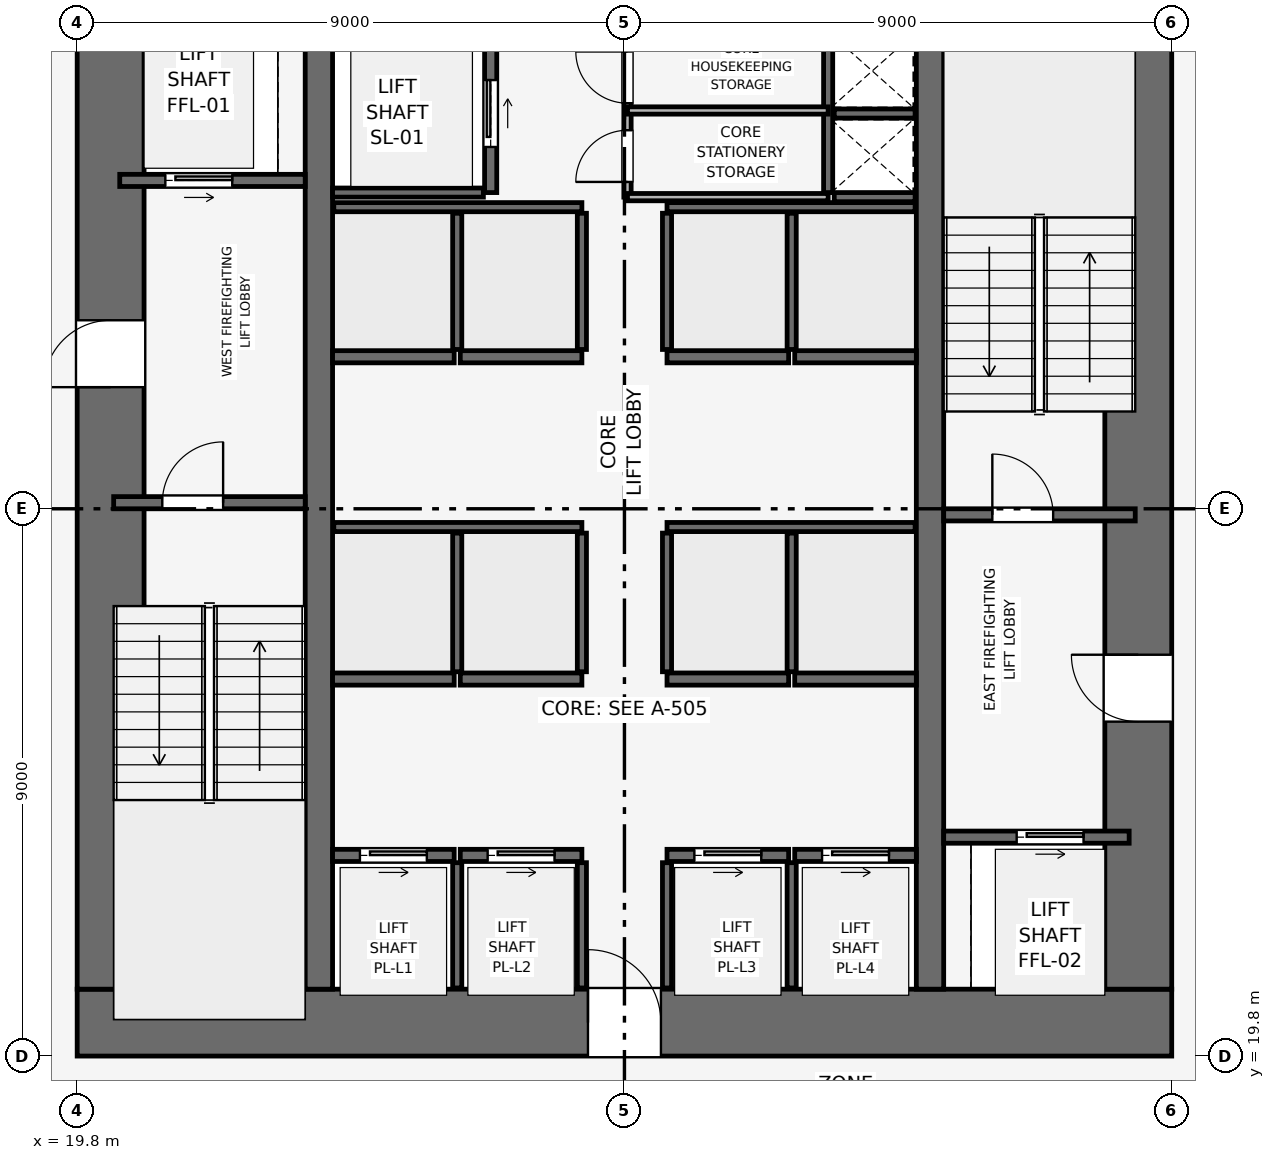
"""IFC4 building model, lengths in metres.
Left out: names, types, materials, properties, quantities, classifications, styles, units other than length and angle.
Written with IfcOpenShell. Run it as: python <this file> out.ifc"""

import sys

from ifc_helpers import new_model, si_unit, direction, frame, frame_2d, origin, place, context, subcontext, project, spatial, rectangle, extrude, element, fill, save


model = new_model("IFC4")
c1 = context("Model", 3, precision=1e-05, world=origin(), true_north=direction((0.0, 1.0)))
c2 = subcontext(c1, "Body", "Model", "MODEL_VIEW")
j1 = project(units=[si_unit("LENGTHUNIT", "METRE"), si_unit("PLANEANGLEUNIT", "RADIAN")], contexts=[c1])
p1 = place(None, origin())
s1 = spatial("IfcSite", under=j1, at=p1, CompositionType="ELEMENT")
p2 = place(p1, origin())
s2 = spatial("IfcBuilding", under=s1, at=p2, CompositionType="ELEMENT")
p3 = place(p2, frame((0.0, 0.0, 69.0)))
s3 = spatial("IfcBuildingStorey", under=s2, at=p3, CompositionType="ELEMENT", Elevation=69.0)
p4 = place(p3, frame((19.8, 20.35, 0.0), z_axis=(0.0, 0.0, 1.0), x_axis=(1.0, 0.0, 0.0)))
e1 = element("IfcWall", 1, at=p4, inside=s3, PredefinedType="SHEAR", context=c2, shape_type="SweptSolid", body=[
    extrude(rectangle(XDim=18.0, YDim=1.1, at=frame_2d((9.0, 0.0))), origin(), (0.0, 0.0, 1.0), 3.9),
])
p5 = place(p4, frame((8.4, 0.0, 0.0)))
e2 = element("IfcOpeningElement", 2, at=p5, cuts=e1, PredefinedType="OPENING", context=c2, shape_type="SweptSolid", body=[
    extrude(rectangle(XDim=1.2, YDim=2.2, at=frame_2d((0.6, 1.1))), frame((0.0, 0.56, 0.0), z_axis=(0.0, -1.0, 0.0), x_axis=(1.0, 0.0, 0.0)), (0.0, 0.0, 1.0), 1.12),
])
p6 = place(p3, frame((20.35, 20.9, 0.0), z_axis=(0.0, 0.0, 1.0), x_axis=(0.0, 1.0, 0.0)))
e3 = element("IfcWall", 3, at=p6, inside=s3, PredefinedType="SHEAR", context=c2, shape_type="SweptSolid", body=[
    extrude(rectangle(XDim=15.8, YDim=1.1, at=frame_2d((7.9, 0.0))), origin(), (0.0, 0.0, 1.0), 3.9),
])
p7 = place(p6, frame((9.9, 0.0, 0.0)))
e4 = element("IfcOpeningElement", 4, at=p7, cuts=e3, PredefinedType="OPENING", context=c2, shape_type="SweptSolid", body=[
    extrude(rectangle(XDim=1.1, YDim=2.15, at=frame_2d((0.55, 1.075))), frame((0.0, 0.56, 0.0), z_axis=(0.0, -1.0, 0.0), x_axis=(1.0, 0.0, 0.0)), (0.0, 0.0, 1.0), 1.12),
])
p8 = place(p3, frame((37.25, 20.9, 0.0), z_axis=(0.0, 0.0, 1.0), x_axis=(0.0, 1.0, 0.0)))
e5 = element("IfcWall", 5, at=p8, inside=s3, PredefinedType="SHEAR", context=c2, shape_type="SweptSolid", body=[
    extrude(rectangle(XDim=15.8, YDim=1.1, at=frame_2d((7.9, 0.0))), origin(), (0.0, 0.0, 1.0), 3.9),
])
p9 = place(p8, frame((4.4, 0.0, 0.0)))
e6 = element("IfcOpeningElement", 6, at=p9, cuts=e5, PredefinedType="OPENING", context=c2, shape_type="SweptSolid", body=[
    extrude(rectangle(XDim=1.1, YDim=2.15, at=frame_2d((0.55, 1.075))), frame((0.0, 0.56, 0.0), z_axis=(0.0, -1.0, 0.0), x_axis=(1.0, 0.0, 0.0)), (0.0, 0.0, 1.0), 1.12),
])
for number, where, z_axis, x_axis in (
    (7, (23.775, 20.9, 0.0), (0.0, 0.0, 1.0), (0.0, 1.0, 0.0)),
    (8, (33.825, 20.9, 0.0), (0.0, 0.0, 1.0), (0.0, 1.0, 0.0)),
):
    element("IfcWall", number, at=place(p3, frame(where, z_axis=z_axis, x_axis=x_axis)), inside=s3, PredefinedType="SHEAR", context=c2, shape_type="SweptSolid", body=[
        extrude(rectangle(XDim=15.8, YDim=0.45, at=frame_2d((7.9, 0.0))), origin(), (0.0, 0.0, 1.0), 3.9),
    ])
p10 = place(p3, frame((20.4, 28.9, 0.0), z_axis=(0.0, 0.0, 1.0), x_axis=(1.0, 0.0, 0.0)))
e9 = element("IfcWall", 9, at=p10, inside=s3, PredefinedType="SHEAR", context=c2, shape_type="SweptSolid", body=[
    extrude(rectangle(XDim=3.15, YDim=0.2, at=frame_2d((1.575, 0.0))), origin(), (0.0, 0.0, 1.0), 3.65),
])
p11 = place(p10, frame((0.8, 0.0, 0.0)))
e10 = element("IfcOpeningElement", 10, at=p11, cuts=e9, PredefinedType="OPENING", context=c2, shape_type="SweptSolid", body=[
    extrude(rectangle(XDim=1.0, YDim=2.1, at=frame_2d((0.5, 1.05))), frame((0.0, 0.11, 0.0), z_axis=(0.0, -1.0, 0.0), x_axis=(1.0, 0.0, 0.0)), (0.0, 0.0, 1.0), 0.22),
])
p12 = place(p3, frame((34.05, 28.7, 0.0), z_axis=(0.0, 0.0, 1.0), x_axis=(1.0, 0.0, 0.0)))
e11 = element("IfcWall", 11, at=p12, inside=s3, PredefinedType="SHEAR", context=c2, shape_type="SweptSolid", body=[
    extrude(rectangle(XDim=3.15, YDim=0.2, at=frame_2d((1.575, 0.0))), origin(), (0.0, 0.0, 1.0), 3.65),
])
p13 = place(p12, frame((0.8, 0.0, 0.0)))
e12 = element("IfcOpeningElement", 12, at=p13, cuts=e11, PredefinedType="OPENING", context=c2, shape_type="SweptSolid", body=[
    extrude(rectangle(XDim=1.0, YDim=2.1, at=frame_2d((0.5, 1.05))), frame((0.0, 0.11, 0.0), z_axis=(0.0, -1.0, 0.0), x_axis=(1.0, 0.0, 0.0)), (0.0, 0.0, 1.0), 0.22),
])
p14 = place(p3, frame((32.15, 34.0, 0.0), z_axis=(0.0, 0.0, 1.0), x_axis=(0.0, 1.0, 0.0)))
e13 = element("IfcWall", 13, at=p14, inside=s3, PredefinedType="SHEAR", context=c2, shape_type="SweptSolid", body=[
    extrude(rectangle(XDim=2.7, YDim=0.15, at=frame_2d((1.35, 0.0))), origin(), (0.0, 0.0, 1.0), 3.65),
])
for number, where, z_axis, x_axis in (
    (14, (32.25, 33.925, 0.0), (0.0, 0.0, 1.0), (1.0, 0.0, 0.0)),
    (15, (32.25, 35.3, 0.0), (0.0, 0.0, 1.0), (1.0, 0.0, 0.0)),
):
    element("IfcWall", number, at=place(p3, frame(where, z_axis=z_axis, x_axis=x_axis)), inside=s3, PredefinedType="SHEAR", context=c2, shape_type="SweptSolid", body=[
        extrude(rectangle(XDim=1.33, YDim=0.15, at=frame_2d((0.665, 0.0))), origin(), (0.0, 0.0, 1.0), 3.65),
    ])
p15 = place(p3, frame((20.5, 34.2, 0.0), z_axis=(0.0, 0.0, 1.0), x_axis=(1.0, 0.0, 0.0)))
e16 = element("IfcWall", 16, at=p15, inside=s3, PredefinedType="SHEAR", context=c2, shape_type="SweptSolid", body=[
    extrude(rectangle(XDim=3.05, YDim=0.2, at=frame_2d((1.525, 0.0))), origin(), (0.0, 0.0, 1.0), 3.65),
])
p16 = place(p15, frame((0.75, 0.0, 0.0)))
e17 = element("IfcOpeningElement", 17, at=p16, cuts=e16, PredefinedType="OPENING", context=c2, shape_type="SweptSolid", body=[
    extrude(rectangle(XDim=1.1, YDim=2.15, at=frame_2d((0.55, 1.075))), frame((0.0, 0.11, 0.0), z_axis=(0.0, -1.0, 0.0), x_axis=(1.0, 0.0, 0.0)), (0.0, 0.0, 1.0), 0.22),
])
p17 = place(p3, frame((34.05, 23.4, 0.0), z_axis=(0.0, 0.0, 1.0), x_axis=(1.0, 0.0, 0.0)))
e18 = element("IfcWall", 18, at=p17, inside=s3, PredefinedType="SHEAR", context=c2, shape_type="SweptSolid", body=[
    extrude(rectangle(XDim=3.05, YDim=0.2, at=frame_2d((1.525, 0.0))), origin(), (0.0, 0.0, 1.0), 3.65),
])
p18 = place(p17, frame((1.2, 0.0, 0.0)))
e19 = element("IfcOpeningElement", 19, at=p18, cuts=e18, PredefinedType="OPENING", context=c2, shape_type="SweptSolid", body=[
    extrude(rectangle(XDim=1.1, YDim=2.15, at=frame_2d((0.55, 1.075))), frame((0.0, 0.11, 0.0), z_axis=(0.0, -1.0, 0.0), x_axis=(1.0, 0.0, 0.0)), (0.0, 0.0, 1.0), 0.22),
])
p19 = place(p3, frame((26.6, 34.0, 0.0), z_axis=(0.0, 0.0, 1.0), x_axis=(0.0, 1.0, 0.0)))
e20 = element("IfcWall", 20, at=p19, inside=s3, PredefinedType="SHEAR", context=c2, shape_type="SweptSolid", body=[
    extrude(rectangle(XDim=2.7, YDim=0.2, at=frame_2d((1.35, 0.0))), origin(), (0.0, 0.0, 1.0), 3.65),
])
p20 = place(p19, frame((0.75, 0.0, 0.0)))
e21 = element("IfcOpeningElement", 21, at=p20, cuts=e20, PredefinedType="OPENING", context=c2, shape_type="SweptSolid", body=[
    extrude(rectangle(XDim=1.1, YDim=2.15, at=frame_2d((0.55, 1.075))), frame((0.0, 0.11, 0.0), z_axis=(0.0, -1.0, 0.0), x_axis=(1.0, 0.0, 0.0)), (0.0, 0.0, 1.0), 0.22),
])
p21 = place(p3, frame((24.0, 34.0, 0.0), z_axis=(0.0, 0.0, 1.0), x_axis=(1.0, 0.0, 0.0)))
e22 = element("IfcWall", 22, at=p21, inside=s3, PredefinedType="SHEAR", context=c2, shape_type="SweptSolid", body=[
    extrude(rectangle(XDim=2.48, YDim=0.15, at=frame_2d((1.24, 0.0))), origin(), (0.0, 0.0, 1.0), 3.65),
])
p22 = place(p3, frame((24.0, 23.1, 0.0), z_axis=(0.0, 0.0, 1.0), x_axis=(1.0, 0.0, 0.0)))
e23 = element("IfcWall", 23, at=p22, inside=s3, PredefinedType="SHEAR", context=c2, shape_type="SweptSolid", body=[
    extrude(rectangle(XDim=2.0, YDim=0.2, at=frame_2d((1.0, 0.0))), origin(), (0.0, 0.0, 1.0), 3.65),
])
p23 = place(p22, frame((0.45, 0.0, 0.0)))
e24 = element("IfcOpeningElement", 24, at=p23, cuts=e23, PredefinedType="OPENING", context=c2, shape_type="SweptSolid", body=[
    extrude(rectangle(XDim=1.1, YDim=2.15, at=frame_2d((0.55, 1.075))), frame((0.0, 0.11, 0.0), z_axis=(0.0, -1.0, 0.0), x_axis=(1.0, 0.0, 0.0)), (0.0, 0.0, 1.0), 0.22),
])
p24 = place(p3, frame((26.1, 23.1, 0.0), z_axis=(0.0, 0.0, 1.0), x_axis=(1.0, 0.0, 0.0)))
e25 = element("IfcWall", 25, at=p24, inside=s3, PredefinedType="SHEAR", context=c2, shape_type="SweptSolid", body=[
    extrude(rectangle(XDim=2.0, YDim=0.2, at=frame_2d((1.0, 0.0))), origin(), (0.0, 0.0, 1.0), 3.65),
])
p25 = place(p24, frame((0.45, 0.0, 0.0)))
e26 = element("IfcOpeningElement", 26, at=p25, cuts=e25, PredefinedType="OPENING", context=c2, shape_type="SweptSolid", body=[
    extrude(rectangle(XDim=1.1, YDim=2.15, at=frame_2d((0.55, 1.075))), frame((0.0, 0.11, 0.0), z_axis=(0.0, -1.0, 0.0), x_axis=(1.0, 0.0, 0.0)), (0.0, 0.0, 1.0), 0.22),
])
p26 = place(p3, frame((29.5, 23.1, 0.0), z_axis=(0.0, 0.0, 1.0), x_axis=(1.0, 0.0, 0.0)))
e27 = element("IfcWall", 27, at=p26, inside=s3, PredefinedType="SHEAR", context=c2, shape_type="SweptSolid", body=[
    extrude(rectangle(XDim=2.0, YDim=0.2, at=frame_2d((1.0, 0.0))), origin(), (0.0, 0.0, 1.0), 3.65),
])
p27 = place(p26, frame((0.45, 0.0, 0.0)))
e28 = element("IfcOpeningElement", 28, at=p27, cuts=e27, PredefinedType="OPENING", context=c2, shape_type="SweptSolid", body=[
    extrude(rectangle(XDim=1.1, YDim=2.15, at=frame_2d((0.55, 1.075))), frame((0.0, 0.11, 0.0), z_axis=(0.0, -1.0, 0.0), x_axis=(1.0, 0.0, 0.0)), (0.0, 0.0, 1.0), 0.22),
])
p28 = place(p3, frame((31.6, 23.1, 0.0), z_axis=(0.0, 0.0, 1.0), x_axis=(1.0, 0.0, 0.0)))
e29 = element("IfcWall", 29, at=p28, inside=s3, PredefinedType="SHEAR", context=c2, shape_type="SweptSolid", body=[
    extrude(rectangle(XDim=2.0, YDim=0.2, at=frame_2d((1.0, 0.0))), origin(), (0.0, 0.0, 1.0), 3.65),
])
p29 = place(p28, frame((0.45, 0.0, 0.0)))
e30 = element("IfcOpeningElement", 30, at=p29, cuts=e29, PredefinedType="OPENING", context=c2, shape_type="SweptSolid", body=[
    extrude(rectangle(XDim=1.1, YDim=2.15, at=frame_2d((0.55, 1.075))), frame((0.0, 0.11, 0.0), z_axis=(0.0, -1.0, 0.0), x_axis=(1.0, 0.0, 0.0)), (0.0, 0.0, 1.0), 0.22),
])
for number, where, z_axis, x_axis in (
    (31, (24.0, 26.0, 0.0), (0.0, 0.0, 1.0), (1.0, 0.0, 0.0)),
    (32, (26.1, 26.0, 0.0), (0.0, 0.0, 1.0), (1.0, 0.0, 0.0)),
    (33, (29.5, 26.0, 0.0), (0.0, 0.0, 1.0), (1.0, 0.0, 0.0)),
    (34, (31.6, 26.0, 0.0), (0.0, 0.0, 1.0), (1.0, 0.0, 0.0)),
    (35, (24.0, 31.3, 0.0), (0.0, 0.0, 1.0), (1.0, 0.0, 0.0)),
    (36, (26.1, 31.3, 0.0), (0.0, 0.0, 1.0), (1.0, 0.0, 0.0)),
    (37, (29.5, 31.3, 0.0), (0.0, 0.0, 1.0), (1.0, 0.0, 0.0)),
    (38, (31.6, 31.3, 0.0), (0.0, 0.0, 1.0), (1.0, 0.0, 0.0)),
):
    element("IfcWall", number, at=place(p3, frame(where, z_axis=z_axis, x_axis=x_axis)), inside=s3, PredefinedType="SHEAR", context=c2, shape_type="SweptSolid", body=[
        extrude(rectangle(XDim=2.0, YDim=0.2, at=frame_2d((1.0, 0.0))), origin(), (0.0, 0.0, 1.0), 3.65),
    ])
for number, where, z_axis, x_axis in (
    (39, (26.05, 20.92, 0.0), (0.0, 0.0, 1.0), (0.0, 1.0, 0.0)),
    (40, (28.1, 20.92, 0.0), (0.0, 0.0, 1.0), (0.0, 1.0, 0.0)),
    (41, (29.5, 20.92, 0.0), (0.0, 0.0, 1.0), (0.0, 1.0, 0.0)),
    (42, (31.55, 20.92, 0.0), (0.0, 0.0, 1.0), (0.0, 1.0, 0.0)),
):
    element("IfcWall", number, at=place(p3, frame(where, z_axis=z_axis, x_axis=x_axis)), inside=s3, PredefinedType="SHEAR", context=c2, shape_type="SweptSolid", body=[
        extrude(rectangle(XDim=2.06, YDim=0.15, at=frame_2d((1.03, 0.0))), origin(), (0.0, 0.0, 1.0), 3.65),
    ])
for number, where, z_axis, x_axis in (
    (43, (24.02, 28.5, 0.0), (0.0, 0.0, 1.0), (1.0, 0.0, 0.0)),
    (44, (29.5, 28.5, 0.0), (0.0, 0.0, 1.0), (1.0, 0.0, 0.0)),
):
    element("IfcWall", number, at=place(p3, frame(where, z_axis=z_axis, x_axis=x_axis)), inside=s3, PredefinedType="SHEAR", context=c2, shape_type="SweptSolid", body=[
        extrude(rectangle(XDim=4.08, YDim=0.15, at=frame_2d((2.04, 0.0))), origin(), (0.0, 0.0, 1.0), 3.65),
    ])
for number, where, z_axis, x_axis in (
    (45, (26.05, 26.12, 0.0), (0.0, 0.0, 1.0), (0.0, 1.0, 0.0)),
    (46, (28.1, 26.12, 0.0), (0.0, 0.0, 1.0), (0.0, 1.0, 0.0)),
    (47, (29.5, 26.12, 0.0), (0.0, 0.0, 1.0), (0.0, 1.0, 0.0)),
    (48, (31.55, 26.12, 0.0), (0.0, 0.0, 1.0), (0.0, 1.0, 0.0)),
):
    element("IfcWall", number, at=place(p3, frame(where, z_axis=z_axis, x_axis=x_axis)), inside=s3, PredefinedType="SHEAR", context=c2, shape_type="SweptSolid", body=[
        extrude(rectangle(XDim=2.28, YDim=0.15, at=frame_2d((1.14, 0.0))), origin(), (0.0, 0.0, 1.0), 3.65),
    ])
for number, where, z_axis, x_axis in (
    (49, (24.02, 33.76, 0.0), (0.0, 0.0, 1.0), (1.0, 0.0, 0.0)),
    (50, (29.5, 33.76, 0.0), (0.0, 0.0, 1.0), (1.0, 0.0, 0.0)),
):
    element("IfcWall", number, at=place(p3, frame(where, z_axis=z_axis, x_axis=x_axis)), inside=s3, PredefinedType="SHEAR", context=c2, shape_type="SweptSolid", body=[
        extrude(rectangle(XDim=4.08, YDim=0.15, at=frame_2d((2.04, 0.0))), origin(), (0.0, 0.0, 1.0), 3.65),
    ])
for number, where, z_axis, x_axis in (
    (51, (26.05, 31.42, 0.0), (0.0, 0.0, 1.0), (0.0, 1.0, 0.0)),
    (52, (28.1, 31.42, 0.0), (0.0, 0.0, 1.0), (0.0, 1.0, 0.0)),
    (53, (29.5, 31.42, 0.0), (0.0, 0.0, 1.0), (0.0, 1.0, 0.0)),
    (54, (31.55, 31.42, 0.0), (0.0, 0.0, 1.0), (0.0, 1.0, 0.0)),
):
    element("IfcWall", number, at=place(p3, frame(where, z_axis=z_axis, x_axis=x_axis)), inside=s3, PredefinedType="SHEAR", context=c2, shape_type="SweptSolid", body=[
        extrude(rectangle(XDim=2.24, YDim=0.15, at=frame_2d((1.12, 0.0))), origin(), (0.0, 0.0, 1.0), 3.65),
    ])
p30 = place(p3, frame((28.85, 33.925, 0.0), z_axis=(0.0, 0.0, 1.0), x_axis=(0.0, 1.0, 0.0)))
e55 = element("IfcWall", 55, at=p30, inside=s3, PredefinedType="PARTITIONING", context=c2, shape_type="SweptSolid", body=[
    extrude(rectangle(XDim=2.775, YDim=0.12, at=frame_2d((1.387, 0.0))), origin(), (0.0, 0.0, 1.0), 3.65),
])
p31 = place(p30, frame((0.25, 0.0, 0.0)))
e56 = element("IfcOpeningElement", 56, at=p31, cuts=e55, PredefinedType="OPENING", context=c2, shape_type="SweptSolid", body=[
    extrude(rectangle(XDim=0.85, YDim=2.1, at=frame_2d((0.425, 1.05))), frame((0.0, 0.07, 0.0), z_axis=(0.0, -1.0, 0.0), x_axis=(1.0, 0.0, 0.0)), (0.0, 0.0, 1.0), 0.14),
])
p32 = place(p30, frame((1.545, 0.0, 0.0)))
e57 = element("IfcOpeningElement", 57, at=p32, cuts=e55, PredefinedType="OPENING", context=c2, shape_type="SweptSolid", body=[
    extrude(rectangle(XDim=0.85, YDim=2.1, at=frame_2d((0.425, 1.05))), frame((0.0, 0.07, 0.0), z_axis=(0.0, -1.0, 0.0), x_axis=(1.0, 0.0, 0.0)), (0.0, 0.0, 1.0), 0.14),
])
for number, where, z_axis, x_axis in (
    (58, (28.85, 35.35, 0.0), (0.0, 0.0, 1.0), (1.0, 0.0, 0.0)),
    (59, (28.85, 33.925, 0.0), (0.0, 0.0, 1.0), (1.0, 0.0, 0.0)),
):
    element("IfcWall", number, at=place(p3, frame(where, z_axis=z_axis, x_axis=x_axis)), inside=s3, PredefinedType="PARTITIONING", context=c2, shape_type="SweptSolid", body=[
        extrude(rectangle(XDim=3.3, YDim=0.12, at=frame_2d((1.65, 0.0))), origin(), (0.0, 0.0, 1.0), 3.65),
    ])
p33 = place(p11, origin())
e60 = element("IfcDoor", 60, at=p33, inside=s3, OperationType="SINGLE_SWING_RIGHT", PredefinedType="DOOR", context=c2, shape_type="SweptSolid", body=[
    extrude(rectangle(XDim=1.0, YDim=2.1, at=frame_2d((0.5, 1.05))), frame((0.0, 0.025, 0.0), z_axis=(0.0, -1.0, 0.0), x_axis=(1.0, 0.0, 0.0)), (0.0, 0.0, 1.0), 0.05),
])
fill(e10, e60)
p34 = place(p13, origin())
e61 = element("IfcDoor", 61, at=p34, inside=s3, OperationType="SINGLE_SWING_LEFT", PredefinedType="DOOR", context=c2, shape_type="SweptSolid", body=[
    extrude(rectangle(XDim=1.0, YDim=2.1, at=frame_2d((0.5, 1.05))), frame((0.0, 0.025, 0.0), z_axis=(0.0, -1.0, 0.0), x_axis=(1.0, 0.0, 0.0)), (0.0, 0.0, 1.0), 0.05),
])
fill(e12, e61)
p35 = place(p16, origin())
e62 = element("IfcDoor", 62, at=p35, inside=s3, OperationType="SLIDING_TO_RIGHT", PredefinedType="DOOR", context=c2, shape_type="SweptSolid", body=[
    extrude(rectangle(XDim=1.1, YDim=2.15, at=frame_2d((0.55, 1.075))), frame((0.0, 0.025, 0.0), z_axis=(0.0, -1.0, 0.0), x_axis=(1.0, 0.0, 0.0)), (0.0, 0.0, 1.0), 0.05),
])
fill(e17, e62)
p36 = place(p18, origin())
e63 = element("IfcDoor", 63, at=p36, inside=s3, OperationType="SLIDING_TO_RIGHT", PredefinedType="DOOR", context=c2, shape_type="SweptSolid", body=[
    extrude(rectangle(XDim=1.1, YDim=2.15, at=frame_2d((0.55, 1.075))), frame((0.0, 0.025, 0.0), z_axis=(0.0, -1.0, 0.0), x_axis=(1.0, 0.0, 0.0)), (0.0, 0.0, 1.0), 0.05),
])
fill(e19, e63)
p37 = place(p20, origin())
e64 = element("IfcDoor", 64, at=p37, inside=s3, OperationType="SLIDING_TO_RIGHT", PredefinedType="DOOR", context=c2, shape_type="SweptSolid", body=[
    extrude(rectangle(XDim=1.1, YDim=2.15, at=frame_2d((0.55, 1.075))), frame((0.0, 0.025, 0.0), z_axis=(0.0, -1.0, 0.0), x_axis=(1.0, 0.0, 0.0)), (0.0, 0.0, 1.0), 0.05),
])
fill(e21, e64)
p38 = place(p23, origin())
e65 = element("IfcDoor", 65, at=p38, inside=s3, OperationType="SLIDING_TO_RIGHT", PredefinedType="DOOR", context=c2, shape_type="SweptSolid", body=[
    extrude(rectangle(XDim=1.1, YDim=2.15, at=frame_2d((0.55, 1.075))), frame((0.0, 0.025, 0.0), z_axis=(0.0, -1.0, 0.0), x_axis=(1.0, 0.0, 0.0)), (0.0, 0.0, 1.0), 0.05),
])
fill(e24, e65)
p39 = place(p25, origin())
e66 = element("IfcDoor", 66, at=p39, inside=s3, OperationType="SLIDING_TO_RIGHT", PredefinedType="DOOR", context=c2, shape_type="SweptSolid", body=[
    extrude(rectangle(XDim=1.1, YDim=2.15, at=frame_2d((0.55, 1.075))), frame((0.0, 0.025, 0.0), z_axis=(0.0, -1.0, 0.0), x_axis=(1.0, 0.0, 0.0)), (0.0, 0.0, 1.0), 0.05),
])
fill(e26, e66)
p40 = place(p27, origin())
e67 = element("IfcDoor", 67, at=p40, inside=s3, OperationType="SLIDING_TO_RIGHT", PredefinedType="DOOR", context=c2, shape_type="SweptSolid", body=[
    extrude(rectangle(XDim=1.1, YDim=2.15, at=frame_2d((0.55, 1.075))), frame((0.0, 0.025, 0.0), z_axis=(0.0, -1.0, 0.0), x_axis=(1.0, 0.0, 0.0)), (0.0, 0.0, 1.0), 0.05),
])
fill(e28, e67)
p41 = place(p29, origin())
e68 = element("IfcDoor", 68, at=p41, inside=s3, OperationType="SLIDING_TO_RIGHT", PredefinedType="DOOR", context=c2, shape_type="SweptSolid", body=[
    extrude(rectangle(XDim=1.1, YDim=2.15, at=frame_2d((0.55, 1.075))), frame((0.0, 0.025, 0.0), z_axis=(0.0, -1.0, 0.0), x_axis=(1.0, 0.0, 0.0)), (0.0, 0.0, 1.0), 0.05),
])
fill(e30, e68)
p42 = place(p31, origin())
e69 = element("IfcDoor", 69, at=p42, inside=s3, OperationType="SINGLE_SWING_LEFT", PredefinedType="DOOR", context=c2, shape_type="SweptSolid", body=[
    extrude(rectangle(XDim=0.85, YDim=2.1, at=frame_2d((0.425, 1.05))), frame((0.0, 0.025, 0.0), z_axis=(0.0, -1.0, 0.0), x_axis=(1.0, 0.0, 0.0)), (0.0, 0.0, 1.0), 0.05),
])
fill(e56, e69)
p43 = place(p32, origin())
e70 = element("IfcDoor", 70, at=p43, inside=s3, OperationType="SINGLE_SWING_RIGHT", PredefinedType="DOOR", context=c2, shape_type="SweptSolid", body=[
    extrude(rectangle(XDim=0.85, YDim=2.1, at=frame_2d((0.425, 1.05))), frame((0.0, 0.025, 0.0), z_axis=(0.0, -1.0, 0.0), x_axis=(1.0, 0.0, 0.0)), (0.0, 0.0, 1.0), 0.05),
])
fill(e57, e70)
p44 = place(p7, origin())
e71 = element("IfcDoor", 71, at=p44, inside=s3, OperationType="SINGLE_SWING_LEFT", PredefinedType="DOOR", context=c2, shape_type="SweptSolid", body=[
    extrude(rectangle(XDim=1.1, YDim=2.15, at=frame_2d((0.55, 1.075))), frame((0.0, 0.025, 0.0), z_axis=(0.0, -1.0, 0.0), x_axis=(1.0, 0.0, 0.0)), (0.0, 0.0, 1.0), 0.05),
])
fill(e4, e71)
p45 = place(p9, origin())
e72 = element("IfcDoor", 72, at=p45, inside=s3, OperationType="SINGLE_SWING_RIGHT", PredefinedType="DOOR", context=c2, shape_type="SweptSolid", body=[
    extrude(rectangle(XDim=1.1, YDim=2.15, at=frame_2d((0.55, 1.075))), frame((0.0, 0.025, 0.0), z_axis=(0.0, -1.0, 0.0), x_axis=(1.0, 0.0, 0.0)), (0.0, 0.0, 1.0), 0.05),
])
fill(e6, e72)
p46 = place(p5, origin())
e73 = element("IfcDoor", 73, at=p46, inside=s3, OperationType="SINGLE_SWING_LEFT", PredefinedType="DOOR", context=c2, shape_type="SweptSolid", body=[
    extrude(rectangle(XDim=1.2, YDim=2.2, at=frame_2d((0.6, 1.1))), frame((0.0, 0.025, 0.0), z_axis=(0.0, -1.0, 0.0), x_axis=(1.0, 0.0, 0.0)), (0.0, 0.0, 1.0), 0.05),
])
fill(e2, e73)
save(model, sys.argv[1])
